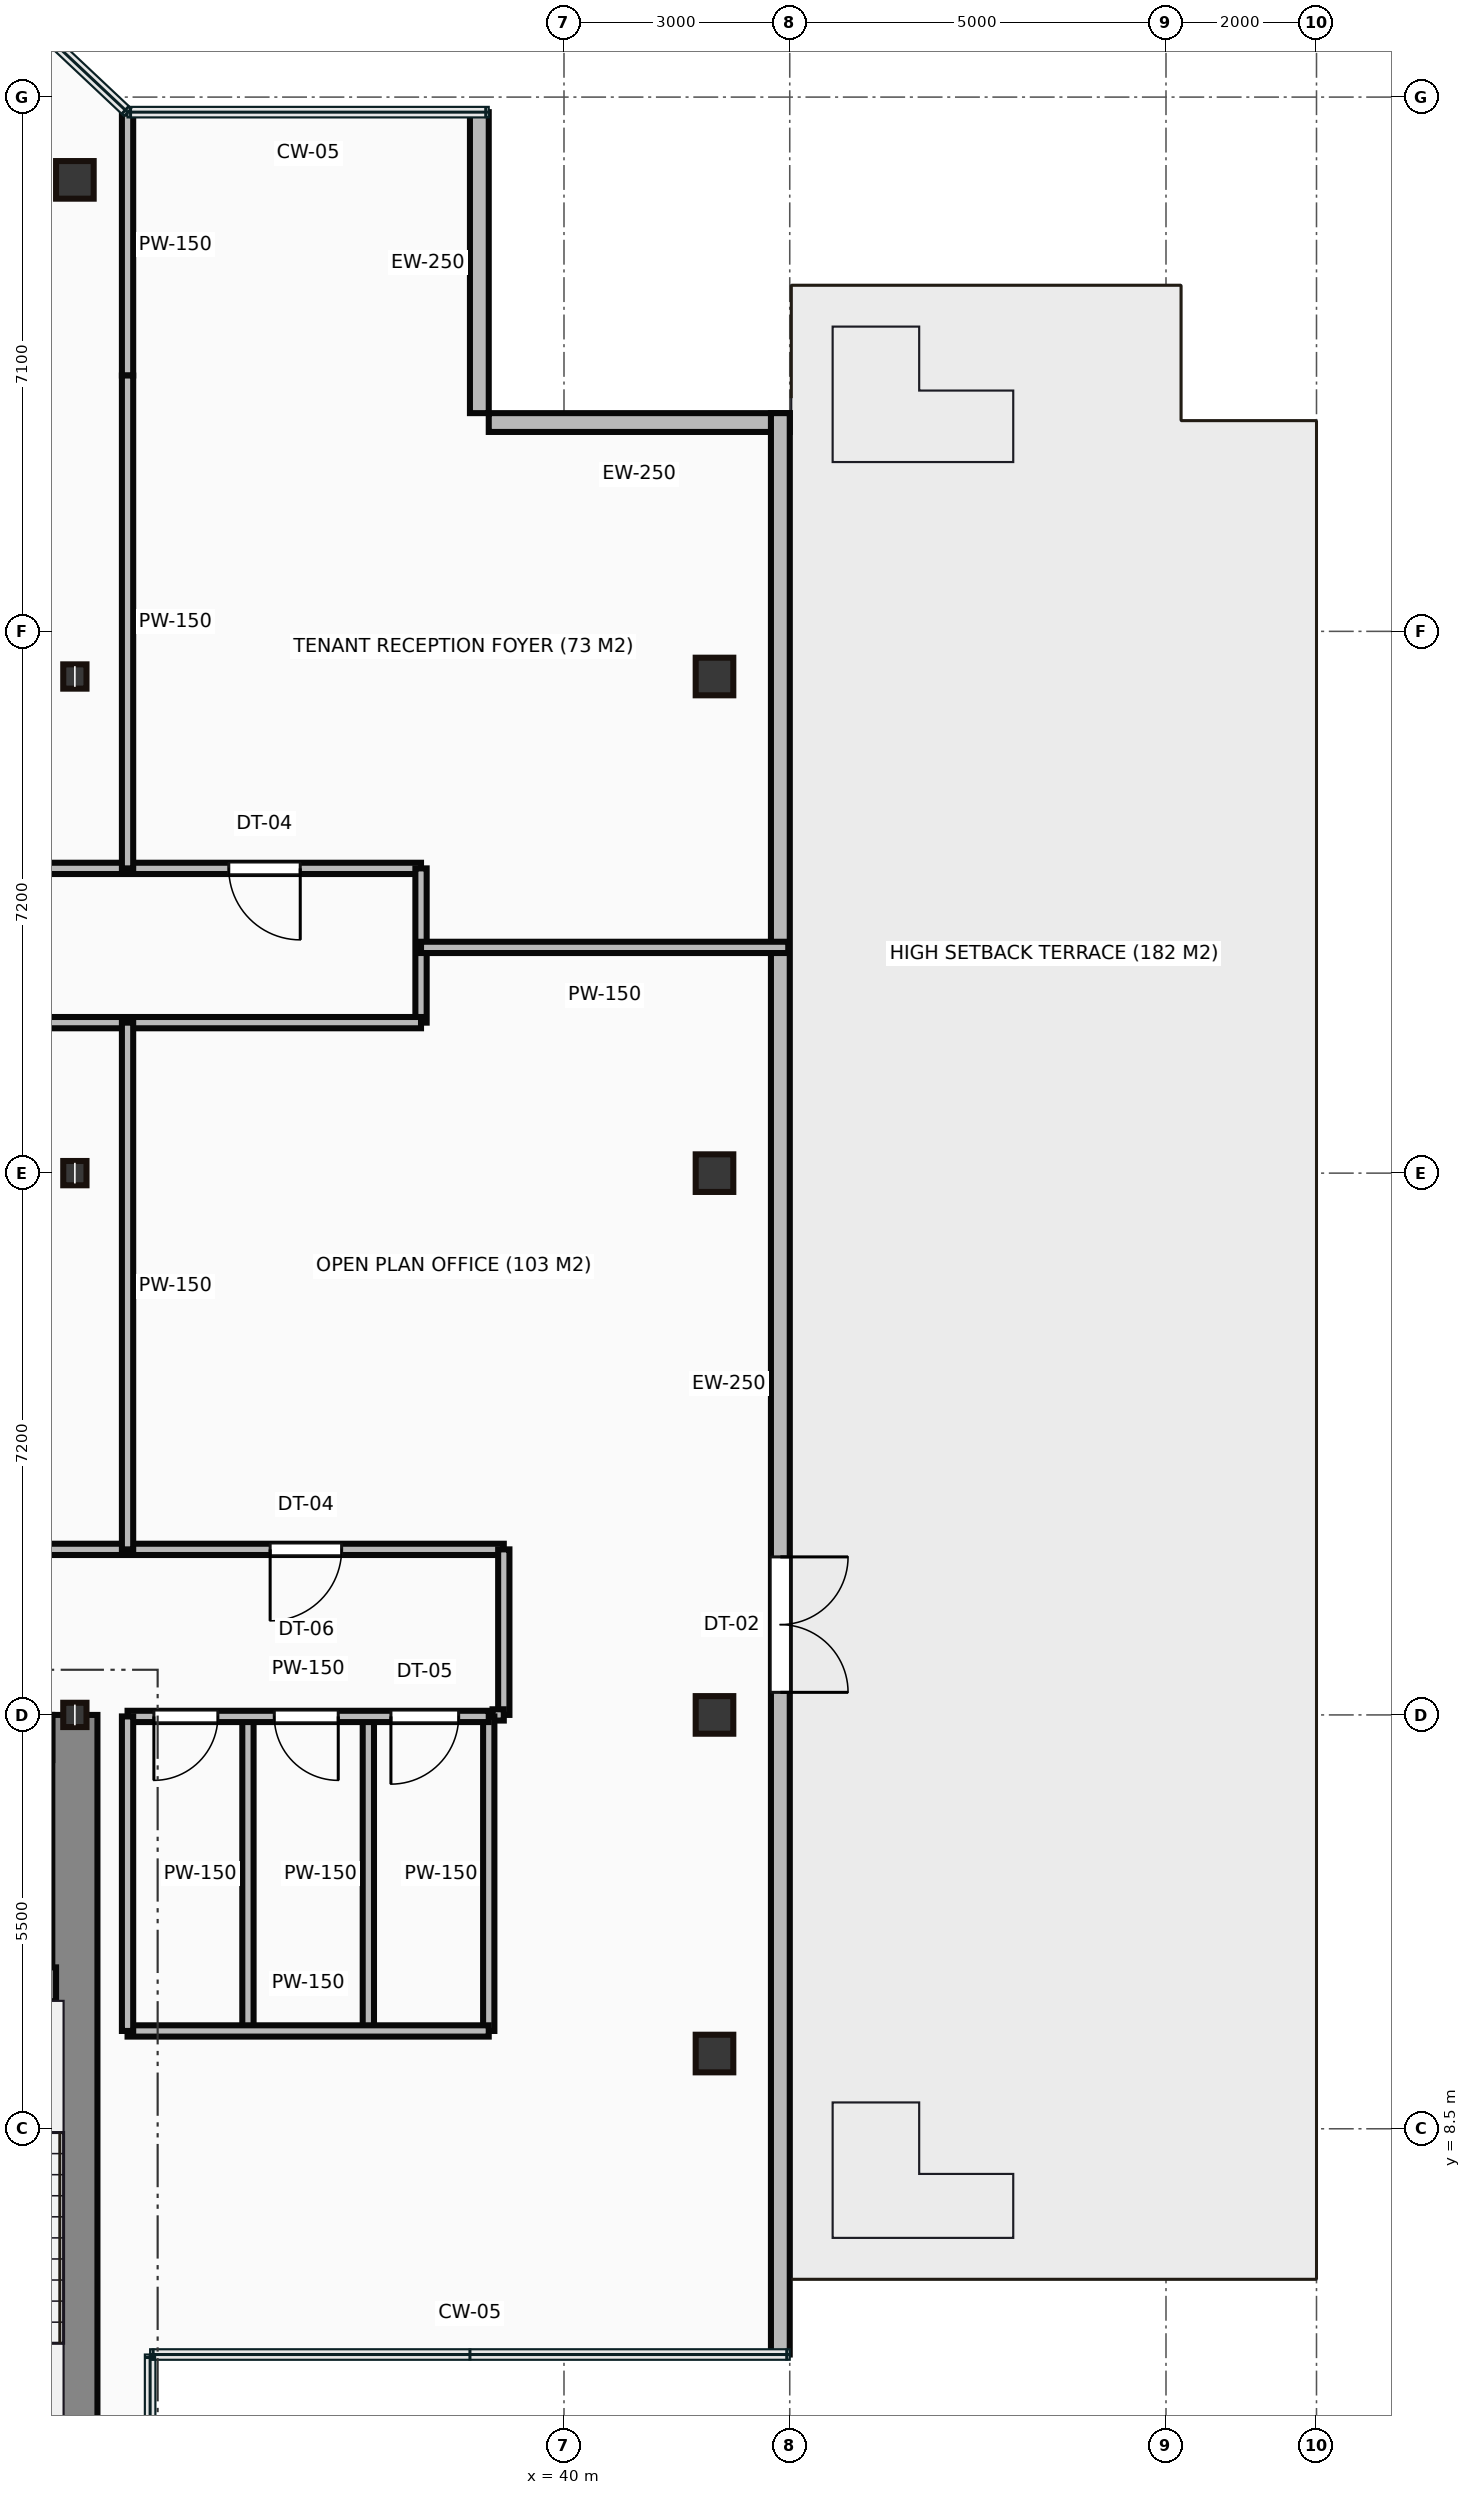
"""IFC4 building model, lengths in metres.
Left out: names, types, materials, properties, quantities, classifications, styles, units other than length and angle.
Written with IfcOpenShell. Run it as: python <this file> out.ifc"""

import sys

from ifc_helpers import new_model, si_unit, direction, frame, frame_2d, origin, origin_2d, place, context, subcontext, project, spatial, rectangle, hollow_rectangle, i_section, extrude, source, transform, mapped, element, fill, save


model = new_model("IFC4")
c1 = context("Model", 3, precision=1e-05, world=origin(), true_north=direction((0.0, 1.0)))
c2 = subcontext(c1, "Body", "Model", "MODEL_VIEW")
j1 = project(units=[si_unit("LENGTHUNIT", "METRE"), si_unit("PLANEANGLEUNIT", "RADIAN")], contexts=[c1])
p1 = place(None, origin())
s1 = spatial("IfcSite", under=j1, at=p1, CompositionType="ELEMENT")
p2 = place(p1, origin())
s2 = spatial("IfcBuilding", under=s1, at=p2, CompositionType="ELEMENT")
p3 = place(p2, frame((0.0, 0.0, 188.6)))
s3 = spatial("IfcBuildingStorey", under=s2, at=p3, CompositionType="ELEMENT", Elevation=188.6)
m1 = source(origin(), c2, "Body", "SweptSolid", [
    extrude(rectangle(XDim=13.1, YDim=0.6, at=frame_2d((6.55, 0.0))), origin(), (0.0, 0.0, 1.0), 3.65),
])
p4 = place(p3, frame((33.5, 0.9, 0.0), z_axis=(0.0, 0.0, 1.0), x_axis=(0.0, 1.0, 0.0)))
e1 = element("IfcWall", 1, at=p4, inside=s3, PredefinedType="SHEAR", context=c2, shape_type="MappedRepresentation", body=[
    mapped(m1, transform((0.0, 0.0, 0.0))),
])
m2 = source(origin(), c2, "Body", "SweptSolid", [
    extrude(rectangle(XDim=3.39, YDim=0.45, at=frame_2d((1.695, 0.0))), origin(), (0.0, 0.0, 1.0), 3.65),
])
p5 = place(p3, frame((29.86, 10.42, 0.0), z_axis=(0.0, 0.0, 1.0), x_axis=(1.0, 0.0, 0.0)))
e2 = element("IfcWall", 2, at=p5, inside=s3, PredefinedType="SHEAR", context=c2, shape_type="MappedRepresentation", body=[
    mapped(m2, transform((0.0, 0.0, 0.0))),
])
p6 = place(p5, frame((1.1, 0.0, 0.0)))
e3 = element("IfcOpeningElement", 3, at=p6, cuts=e2, PredefinedType="OPENING", context=c2, shape_type="SweptSolid", body=[
    extrude(rectangle(XDim=1.1, YDim=2.15, at=frame_2d((0.55, 1.075))), frame((0.0, 0.235, 0.0), z_axis=(0.0, -1.0, 0.0), x_axis=(1.0, 0.0, 0.0)), (0.0, 0.0, 1.0), 0.47),
])
m3 = source(origin(), c2, "Body", "SweptSolid", [
    extrude(i_section(OverallWidth=0.309, OverallDepth=0.323, WebThickness=0.014, FlangeThickness=0.023, at=origin_2d()), origin(), (0.0, 0.0, 1.0), 3.65),
])
for number, where, z_axis, x_axis in (
    (4, (33.5, 14.0, 0.0), (0.0, 0.0, 1.0), (1.0, 0.0, 0.0)),
    (5, (33.5, 21.2, 0.0), (0.0, 0.0, 1.0), (1.0, 0.0, 0.0)),
    (6, (33.5, 27.8, 0.0), (0.0, 0.0, 1.0), (1.0, 0.0, 0.0)),
):
    element("IfcColumn", number, at=place(p3, frame(where, z_axis=z_axis, x_axis=x_axis)), inside=s3, PredefinedType="COLUMN", context=c2, shape_type="MappedRepresentation", body=[
        mapped(m3, transform((0.0, 0.0, 0.0))),
    ])
m4 = source(origin(), c2, "Body", "SweptSolid", [
    extrude(hollow_rectangle(XDim=0.5, YDim=0.5, WallThickness=0.022, at=origin_2d()), origin(), (0.0, 0.0, 1.0), 3.65),
])
for number, where, z_axis, x_axis in (
    (7, (33.5, 34.4, 0.0), (0.0, 0.0, 1.0), (1.0, 0.0, 0.0)),
    (8, (42.0, 9.5, 0.0), (0.0, 0.0, 1.0), (1.0, 0.0, 0.0)),
    (9, (42.0, 14.0, 0.0), (0.0, 0.0, 1.0), (1.0, 0.0, 0.0)),
    (10, (42.0, 21.2, 0.0), (0.0, 0.0, 1.0), (1.0, 0.0, 0.0)),
    (11, (42.0, 27.8, 0.0), (0.0, 0.0, 1.0), (1.0, 0.0, 0.0)),
):
    element("IfcColumn", number, at=place(p3, frame(where, z_axis=z_axis, x_axis=x_axis)), inside=s3, PredefinedType="COLUMN", context=c2, shape_type="MappedRepresentation", body=[
        mapped(m4, transform((0.0, 0.0, 0.0))),
    ])
m5 = source(origin(), c2, "Body", "SweptSolid", [
    extrude(rectangle(XDim=25.8, YDim=0.25, at=frame_2d((12.9, 0.0))), origin(), (0.0, 0.0, 1.0), 3.4),
])
p7 = place(p3, frame((42.875, 5.5, 0.0), z_axis=(0.0, 0.0, 1.0), x_axis=(0.0, 1.0, 0.0)))
e12 = element("IfcWall", 12, at=p7, inside=s3, PredefinedType="STANDARD", context=c2, shape_type="MappedRepresentation", body=[
    mapped(m5, transform((0.0, 0.0, 0.0))),
])
p8 = place(p7, frame((8.8, 0.0, 0.0)))
e13 = element("IfcOpeningElement", 13, at=p8, cuts=e12, PredefinedType="OPENING", context=c2, shape_type="SweptSolid", body=[
    extrude(rectangle(XDim=1.8, YDim=2.2, at=frame_2d((0.9, 1.1))), frame((0.0, 0.135, 0.0), z_axis=(0.0, -1.0, 0.0), x_axis=(1.0, 0.0, 0.0)), (0.0, 0.0, 1.0), 0.27),
])
m6 = source(origin(), c2, "Body", "SweptSolid", [
    extrude(rectangle(XDim=4.0, YDim=0.25, at=frame_2d((2.0, 0.0))), origin(), (0.0, 0.0, 1.0), 3.4),
])
for number, where, z_axis, x_axis in (
    (14, (43.0, 31.175, 0.0), (0.0, 0.0, 1.0), (-1.0, 0.0, 0.0)),
    (15, (38.875, 31.3, 0.0), (0.0, 0.0, 1.0), (0.0, 1.0, 0.0)),
):
    element("IfcWall", number, at=place(p3, frame(where, z_axis=z_axis, x_axis=x_axis)), inside=s3, PredefinedType="STANDARD", context=c2, shape_type="MappedRepresentation", body=[
        mapped(m6, transform((0.0, 0.0, 0.0))),
    ])
m7 = source(origin(), c2, "Body", "SweptSolid", [
    extrude(rectangle(XDim=4.8, YDim=0.15, at=frame_2d((2.4, 0.0))), origin(), (0.0, 0.0, 1.0), 2.787),
])
p9 = place(p3, frame((34.2, 13.98, 0.0), z_axis=(0.0, 0.0, 1.0), x_axis=(1.0, 0.0, 0.0)))
e16 = element("IfcWall", 16, at=p9, inside=s3, PredefinedType="PARTITIONING", context=c2, shape_type="MappedRepresentation", body=[
    mapped(m7, transform((0.0, 0.0, 0.0))),
])
p10 = place(p9, frame((0.35, 0.0, 0.0)))
e17 = element("IfcOpeningElement", 17, at=p10, cuts=e16, PredefinedType="OPENING", context=c2, shape_type="SweptSolid", body=[
    extrude(rectangle(XDim=0.85, YDim=2.1, at=frame_2d((0.425, 1.05))), frame((0.0, 0.085, 0.0), z_axis=(0.0, -1.0, 0.0), x_axis=(1.0, 0.0, 0.0)), (0.0, 0.0, 1.0), 0.17),
])
p11 = place(p9, frame((1.95, 0.0, 0.0)))
e18 = element("IfcOpeningElement", 18, at=p11, cuts=e16, PredefinedType="OPENING", context=c2, shape_type="SweptSolid", body=[
    extrude(rectangle(XDim=0.85, YDim=2.1, at=frame_2d((0.425, 1.05))), frame((0.0, 0.085, 0.0), z_axis=(0.0, -1.0, 0.0), x_axis=(1.0, 0.0, 0.0)), (0.0, 0.0, 1.0), 0.17),
])
p12 = place(p9, frame((3.5, 0.0, 0.0)))
e19 = element("IfcOpeningElement", 19, at=p12, cuts=e16, PredefinedType="OPENING", context=c2, shape_type="SweptSolid", body=[
    extrude(rectangle(XDim=0.9, YDim=2.1, at=frame_2d((0.45, 1.05))), frame((0.0, 0.085, 0.0), z_axis=(0.0, -1.0, 0.0), x_axis=(1.0, 0.0, 0.0)), (0.0, 0.0, 1.0), 0.17),
])
m8 = source(origin(), c2, "Body", "SweptSolid", [
    extrude(rectangle(XDim=4.8, YDim=0.15, at=frame_2d((2.4, 0.0))), origin(), (0.0, 0.0, 1.0), 3.4),
])
p13 = place(p3, frame((34.2, 9.8, 0.0), z_axis=(0.0, 0.0, 1.0), x_axis=(1.0, 0.0, 0.0)))
e20 = element("IfcWall", 20, at=p13, inside=s3, PredefinedType="PARTITIONING", context=c2, shape_type="MappedRepresentation", body=[
    mapped(m8, transform((0.0, 0.0, 0.0))),
])
m9 = source(origin(), c2, "Body", "SweptSolid", [
    extrude(rectangle(XDim=4.18, YDim=0.15, at=frame_2d((2.09, 0.0))), origin(), (0.0, 0.0, 1.0), 3.4),
])
for number, where, z_axis, x_axis in (
    (21, (39.0, 9.8, 0.0), (0.0, 0.0, 1.0), (0.0, 1.0, 0.0)),
    (22, (34.2, 9.8, 0.0), (0.0, 0.0, 1.0), (0.0, 1.0, 0.0)),
    (23, (35.8, 9.8, 0.0), (0.0, 0.0, 1.0), (0.0, 1.0, 0.0)),
    (24, (37.4, 9.8, 0.0), (0.0, 0.0, 1.0), (0.0, 1.0, 0.0)),
):
    element("IfcWall", number, at=place(p3, frame(where, z_axis=z_axis, x_axis=x_axis)), inside=s3, PredefinedType="PARTITIONING", context=c2, shape_type="MappedRepresentation", body=[
        mapped(m9, transform((0.0, 0.0, 0.0))),
    ])
m10 = source(origin(), c2, "Body", "SweptSolid", [
    extrude(rectangle(XDim=26.1, YDim=0.15, at=frame_2d((13.05, 0.0))), origin(), (0.0, 0.0, 1.0), 3.4),
])
p14 = place(p3, frame((12.0, 25.25, 0.0), z_axis=(0.0, 0.0, 1.0), x_axis=(1.0, 0.0, 0.0)))
e25 = element("IfcWall", 25, at=p14, inside=s3, PredefinedType="PARTITIONING", context=c2, shape_type="MappedRepresentation", body=[
    mapped(m10, transform((0.0, 0.0, 0.0))),
])
p15 = place(p14, frame((3.455, 0.0, 0.0)))
e26 = element("IfcOpeningElement", 26, at=p15, cuts=e25, PredefinedType="OPENING", context=c2, shape_type="SweptSolid", body=[
    extrude(rectangle(XDim=0.95, YDim=2.15, at=frame_2d((0.475, 1.075))), frame((0.0, 0.085, 0.0), z_axis=(0.0, -1.0, 0.0), x_axis=(1.0, 0.0, 0.0)), (0.0, 0.0, 1.0), 0.17),
])
p16 = place(p14, frame((14.425, 0.0, 0.0)))
e27 = element("IfcOpeningElement", 27, at=p16, cuts=e25, PredefinedType="OPENING", context=c2, shape_type="SweptSolid", body=[
    extrude(rectangle(XDim=0.95, YDim=2.15, at=frame_2d((0.475, 1.075))), frame((0.0, 0.085, 0.0), z_axis=(0.0, -1.0, 0.0), x_axis=(1.0, 0.0, 0.0)), (0.0, 0.0, 1.0), 0.17),
])
p17 = place(p14, frame((23.545, 0.0, 0.0)))
e28 = element("IfcOpeningElement", 28, at=p17, cuts=e25, PredefinedType="OPENING", context=c2, shape_type="SweptSolid", body=[
    extrude(rectangle(XDim=0.95, YDim=2.15, at=frame_2d((0.475, 1.075))), frame((0.0, 0.085, 0.0), z_axis=(0.0, -1.0, 0.0), x_axis=(1.0, 0.0, 0.0)), (0.0, 0.0, 1.0), 0.17),
])
m11 = source(origin(), c2, "Body", "SweptSolid", [
    extrude(rectangle(XDim=2.05, YDim=0.15, at=frame_2d((1.025, 0.0))), origin(), (0.0, 0.0, 1.0), 3.4),
])
p18 = place(p3, frame((38.1, 25.25, 0.0), z_axis=(0.0, 0.0, 1.0), x_axis=(0.0, -1.0, 0.0)))
e29 = element("IfcWall", 29, at=p18, inside=s3, PredefinedType="PARTITIONING", context=c2, shape_type="MappedRepresentation", body=[
    mapped(m11, transform((0.0, 0.0, 0.0))),
])
p19 = place(p3, frame((38.1, 23.2, 0.0), z_axis=(0.0, 0.0, 1.0), x_axis=(-1.0, 0.0, 0.0)))
e30 = element("IfcWall", 30, at=p19, inside=s3, PredefinedType="PARTITIONING", context=c2, shape_type="MappedRepresentation", body=[
    mapped(m10, transform((0.0, 0.0, 0.0))),
])
p20 = place(p19, frame((10.725, 0.0, 0.0)))
e31 = element("IfcOpeningElement", 31, at=p20, cuts=e30, PredefinedType="OPENING", context=c2, shape_type="SweptSolid", body=[
    extrude(rectangle(XDim=0.95, YDim=2.15, at=frame_2d((0.475, 1.075))), frame((0.0, 0.085, 0.0), z_axis=(0.0, -1.0, 0.0), x_axis=(1.0, 0.0, 0.0)), (0.0, 0.0, 1.0), 0.17),
])
m12 = source(origin(), c2, "Body", "SweptSolid", [
    extrude(rectangle(XDim=27.2, YDim=0.15, at=frame_2d((13.6, 0.0))), origin(), (0.0, 0.0, 1.0), 3.4),
])
p21 = place(p3, frame((12.0, 16.2, 0.0), z_axis=(0.0, 0.0, 1.0), x_axis=(1.0, 0.0, 0.0)))
e32 = element("IfcWall", 32, at=p21, inside=s3, PredefinedType="PARTITIONING", context=c2, shape_type="MappedRepresentation", body=[
    mapped(m12, transform((0.0, 0.0, 0.0))),
])
p22 = place(p21, frame((3.455, 0.0, 0.0)))
e33 = element("IfcOpeningElement", 33, at=p22, cuts=e32, PredefinedType="OPENING", context=c2, shape_type="SweptSolid", body=[
    extrude(rectangle(XDim=0.95, YDim=2.15, at=frame_2d((0.475, 1.075))), frame((0.0, 0.085, 0.0), z_axis=(0.0, -1.0, 0.0), x_axis=(1.0, 0.0, 0.0)), (0.0, 0.0, 1.0), 0.17),
])
p23 = place(p21, frame((24.095, 0.0, 0.0)))
e34 = element("IfcOpeningElement", 34, at=p23, cuts=e32, PredefinedType="OPENING", context=c2, shape_type="SweptSolid", body=[
    extrude(rectangle(XDim=0.95, YDim=2.15, at=frame_2d((0.475, 1.075))), frame((0.0, 0.085, 0.0), z_axis=(0.0, -1.0, 0.0), x_axis=(1.0, 0.0, 0.0)), (0.0, 0.0, 1.0), 0.17),
])
m13 = source(origin(), c2, "Body", "SweptSolid", [
    extrude(rectangle(XDim=2.2, YDim=0.15, at=frame_2d((1.1, 0.0))), origin(), (0.0, 0.0, 1.0), 3.4),
])
p24 = place(p3, frame((39.2, 16.2, 0.0), z_axis=(0.0, 0.0, 1.0), x_axis=(0.0, -1.0, 0.0)))
e35 = element("IfcWall", 35, at=p24, inside=s3, PredefinedType="PARTITIONING", context=c2, shape_type="MappedRepresentation", body=[
    mapped(m13, transform((0.0, 0.0, 0.0))),
])
m14 = source(origin(), c2, "Body", "SweptSolid", [
    extrude(rectangle(XDim=0.15, YDim=0.15, at=frame_2d((0.075, 0.0))), origin(), (0.0, 0.0, 1.0), 3.4),
])
p25 = place(p3, frame((39.2, 14.0, 0.0), z_axis=(0.0, 0.0, 1.0), x_axis=(-1.0, 0.0, 0.0)))
e36 = element("IfcWall", 36, at=p25, inside=s3, PredefinedType="PARTITIONING", context=c2, shape_type="MappedRepresentation", body=[
    mapped(m14, transform((0.0, 0.0, 0.0))),
])
m15 = source(origin(), c2, "Body", "SweptSolid", [
    extrude(rectangle(XDim=7.0, YDim=0.15, at=frame_2d((3.5, 0.0))), origin(), (0.0, 0.0, 1.0), 3.4),
])
p26 = place(p3, frame((34.2, 23.2, 0.0), z_axis=(0.0, 0.0, 1.0), x_axis=(0.0, -1.0, 0.0)))
e37 = element("IfcWall", 37, at=p26, inside=s3, PredefinedType="PARTITIONING", context=c2, shape_type="MappedRepresentation", body=[
    mapped(m15, transform((0.0, 0.0, 0.0))),
])
m16 = source(origin(), c2, "Body", "SweptSolid", [
    extrude(rectangle(XDim=3.48, YDim=0.15, at=frame_2d((1.74, 0.0))), origin(), (0.0, 0.0, 1.0), 3.4),
])
p27 = place(p3, frame((34.2, 35.28, 0.0), z_axis=(0.0, 0.0, 1.0), x_axis=(0.0, -1.0, 0.0)))
e38 = element("IfcWall", 38, at=p27, inside=s3, PredefinedType="PARTITIONING", context=c2, shape_type="MappedRepresentation", body=[
    mapped(m16, transform((0.0, 0.0, 0.0))),
])
m17 = source(origin(), c2, "Body", "SweptSolid", [
    extrude(rectangle(XDim=6.55, YDim=0.15, at=frame_2d((3.275, 0.0))), origin(), (0.0, 0.0, 1.0), 3.4),
])
p28 = place(p3, frame((34.2, 31.8, 0.0), z_axis=(0.0, 0.0, 1.0), x_axis=(0.0, -1.0, 0.0)))
e39 = element("IfcWall", 39, at=p28, inside=s3, PredefinedType="PARTITIONING", context=c2, shape_type="MappedRepresentation", body=[
    mapped(m17, transform((0.0, 0.0, 0.0))),
])
m18 = source(origin(), c2, "Body", "SweptSolid", [
    extrude(rectangle(XDim=4.88, YDim=0.15, at=frame_2d((2.44, 0.0))), origin(), (0.0, 0.0, 1.0), 3.4),
])
p29 = place(p3, frame((42.98, 24.2, 0.0), z_axis=(0.0, 0.0, 1.0), x_axis=(-1.0, 0.0, 0.0)))
e40 = element("IfcWall", 40, at=p29, inside=s3, PredefinedType="PARTITIONING", context=c2, shape_type="MappedRepresentation", body=[
    mapped(m18, transform((0.0, 0.0, 0.0))),
])
m19 = source(origin(), c2, "Body", "SweptSolid", [
    extrude(rectangle(XDim=1.8, YDim=2.2, at=frame_2d((0.9, 1.1))), frame((0.0, 0.025, 0.0), z_axis=(0.0, -1.0, 0.0), x_axis=(1.0, 0.0, 0.0)), (0.0, 0.0, 1.0), 0.05),
])
p30 = place(p8, frame((1.8, 0.0, 0.0), z_axis=(0.0, 0.0, 1.0), x_axis=(-1.0, 0.0, 0.0)))
e41 = element("IfcDoor", 41, at=p30, inside=s3, OperationType="DOUBLE_DOOR_SINGLE_SWING", PredefinedType="DOOR", context=c2, shape_type="MappedRepresentation", body=[
    mapped(m19, transform((0.0, 0.0, 0.0))),
])
fill(e13, e41)
m20 = source(origin(), c2, "Body", "SweptSolid", [
    extrude(rectangle(XDim=0.85, YDim=2.1, at=frame_2d((0.425, 1.05))), frame((0.0, 0.025, 0.0), z_axis=(0.0, -1.0, 0.0), x_axis=(1.0, 0.0, 0.0)), (0.0, 0.0, 1.0), 0.05),
])
p31 = place(p10, frame((0.85, 0.0, 0.0), z_axis=(0.0, 0.0, 1.0), x_axis=(-1.0, 0.0, 0.0)))
e42 = element("IfcDoor", 42, at=p31, inside=s3, OperationType="SINGLE_SWING_LEFT", PredefinedType="DOOR", context=c2, shape_type="MappedRepresentation", body=[
    mapped(m20, transform((0.0, 0.0, 0.0))),
])
fill(e17, e42)
p32 = place(p11, frame((0.85, 0.0, 0.0), z_axis=(0.0, 0.0, 1.0), x_axis=(-1.0, 0.0, 0.0)))
e43 = element("IfcDoor", 43, at=p32, inside=s3, OperationType="SINGLE_SWING_RIGHT", PredefinedType="DOOR", context=c2, shape_type="MappedRepresentation", body=[
    mapped(m20, transform((0.0, 0.0, 0.0))),
])
fill(e18, e43)
m21 = source(origin(), c2, "Body", "SweptSolid", [
    extrude(rectangle(XDim=0.9, YDim=2.1, at=frame_2d((0.45, 1.05))), frame((0.0, 0.025, 0.0), z_axis=(0.0, -1.0, 0.0), x_axis=(1.0, 0.0, 0.0)), (0.0, 0.0, 1.0), 0.05),
])
p33 = place(p12, frame((0.9, 0.0, 0.0), z_axis=(0.0, 0.0, 1.0), x_axis=(-1.0, 0.0, 0.0)))
e44 = element("IfcDoor", 44, at=p33, inside=s3, OperationType="SINGLE_SWING_LEFT", PredefinedType="DOOR", context=c2, shape_type="MappedRepresentation", body=[
    mapped(m21, transform((0.0, 0.0, 0.0))),
])
fill(e19, e44)
m22 = source(origin(), c2, "Body", "SweptSolid", [
    extrude(rectangle(XDim=0.95, YDim=2.15, at=frame_2d((0.475, 1.075))), frame((0.0, 0.025, 0.0), z_axis=(0.0, -1.0, 0.0), x_axis=(1.0, 0.0, 0.0)), (0.0, 0.0, 1.0), 0.05),
])
p34 = place(p17, origin())
e45 = element("IfcDoor", 45, at=p34, inside=s3, OperationType="SINGLE_SWING_RIGHT", PredefinedType="DOOR", context=c2, shape_type="MappedRepresentation", body=[
    mapped(m22, transform((0.0, 0.0, 0.0))),
])
fill(e28, e45)
p35 = place(p23, origin())
e46 = element("IfcDoor", 46, at=p35, inside=s3, OperationType="SINGLE_SWING_LEFT", PredefinedType="DOOR", context=c2, shape_type="MappedRepresentation", body=[
    mapped(m22, transform((0.0, 0.0, 0.0))),
])
fill(e34, e46)
save(model, sys.argv[1])
